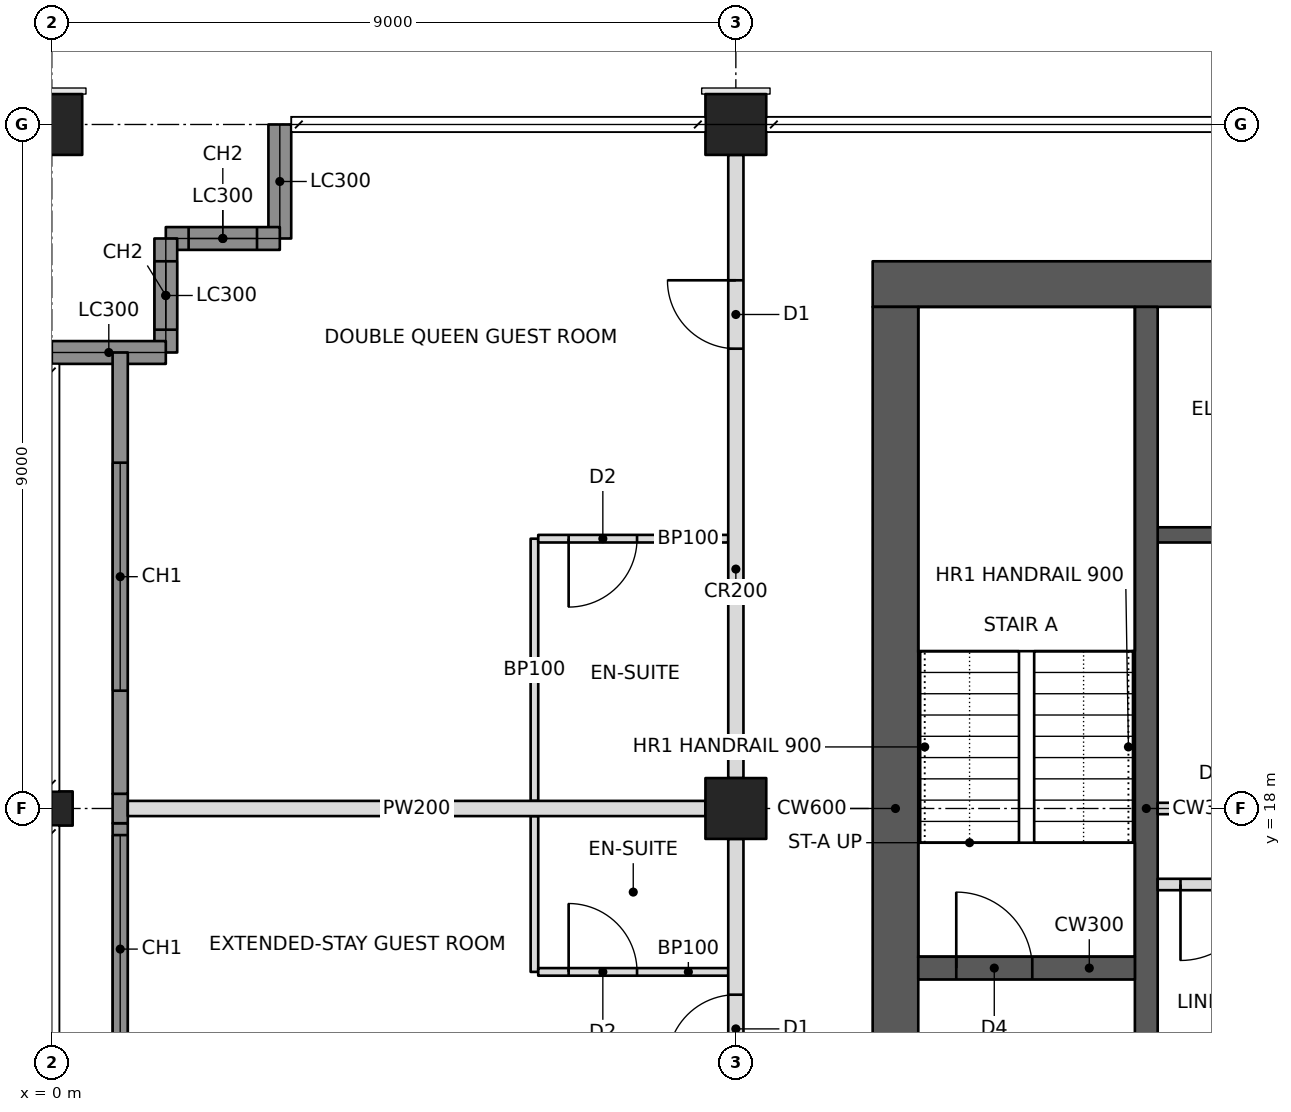
"""IFC4 building model, lengths in metres.
Left out: names, types, materials, properties, quantities, classifications, styles, units other than length and angle.
Written with IfcOpenShell. Run it as: python <this file> out.ifc"""

import sys

from ifc_helpers import new_model, si_unit, direction, frame, frame_2d, origin, origin_2d, place, context, subcontext, project, spatial, rectangle, hollow_rectangle, i_section, extrude, element, fill, save


model = new_model("IFC4")
c1 = context("Model", 3, precision=1e-05, world=origin(), true_north=direction((0.0, 1.0)))
c2 = subcontext(c1, "Body", "Model", "MODEL_VIEW")
j1 = project(units=[si_unit("LENGTHUNIT", "METRE"), si_unit("PLANEANGLEUNIT", "RADIAN")], contexts=[c1])
p1 = place(None, origin())
s1 = spatial("IfcSite", under=j1, at=p1, CompositionType="ELEMENT")
p2 = place(p1, origin())
s2 = spatial("IfcBuilding", under=s1, at=p2, CompositionType="ELEMENT")
p3 = place(p2, frame((0.0, 0.0, 170.6)))
s3 = spatial("IfcBuildingStorey", under=s2, at=p3, CompositionType="ELEMENT", Elevation=170.6)
p4 = place(p3, frame((0.0, 18.0, 0.0), z_axis=(0.0, 0.0, 1.0), x_axis=(0.0, 1.0, 0.0)))
e1 = element("IfcColumn", 1, at=p4, inside=s3, PredefinedType="COLUMN", context=c2, shape_type="SweptSolid", body=[
    extrude(i_section(OverallWidth=0.449, OverallDepth=0.549, WebThickness=0.072, FlangeThickness=0.115, at=origin_2d()), origin(), (0.0, 0.0, 1.0), 3.4),
])
p5 = place(p3, frame((0.0, 27.0, 0.0), z_axis=(0.0, 0.0, 1.0), x_axis=(0.0, 1.0, 0.0)))
e2 = element("IfcColumn", 2, at=p5, inside=s3, PredefinedType="COLUMN", context=c2, shape_type="SweptSolid", body=[
    extrude(hollow_rectangle(XDim=0.8, YDim=0.8, WallThickness=0.07, at=origin_2d()), origin(), (0.0, 0.0, 1.0), 3.4),
])
p6 = place(p3, frame((9.0, 18.0, 0.0), z_axis=(0.0, 0.0, 1.0), x_axis=(1.0, 0.0, 0.0)))
e3 = element("IfcColumn", 3, at=p6, inside=s3, PredefinedType="COLUMN", context=c2, shape_type="SweptSolid", body=[
    extrude(hollow_rectangle(XDim=0.8, YDim=0.8, WallThickness=0.06, at=origin_2d()), origin(), (0.0, 0.0, 1.0), 3.4),
])
p7 = place(p3, frame((9.0, 27.0, 0.0), z_axis=(0.0, 0.0, 1.0), x_axis=(1.0, 0.0, 0.0)))
e4 = element("IfcColumn", 4, at=p7, inside=s3, PredefinedType="COLUMN", context=c2, shape_type="SweptSolid", body=[
    extrude(hollow_rectangle(XDim=0.8, YDim=0.8, WallThickness=0.07, at=origin_2d()), origin(), (0.0, 0.0, 1.0), 3.4),
])
p8 = place(p3, frame((10.8, 24.9, 0.0), z_axis=(0.0, 0.0, 1.0), x_axis=(1.0, 0.0, 0.0)))
e5 = element("IfcWall", 5, at=p8, inside=s3, PredefinedType="SHEAR", context=c2, shape_type="SweptSolid", body=[
    extrude(rectangle(XDim=23.4, YDim=0.6, at=frame_2d((11.7, 0.0))), origin(), (0.0, 0.0, 1.0), 3.4),
])
p9 = place(p8, frame((17.2, 0.0, 0.0)))
e6 = element("IfcOpeningElement", 6, at=p9, cuts=e5, PredefinedType="OPENING", context=c2, shape_type="SweptSolid", body=[
    extrude(rectangle(XDim=1.8, YDim=2.1, at=frame_2d((0.9, 1.05))), frame((0.0, 0.31, 0.0), z_axis=(0.0, -1.0, 0.0), x_axis=(1.0, 0.0, 0.0)), (0.0, 0.0, 1.0), 0.62),
])
p10 = place(p8, frame((21.1, 0.0, 0.0)))
e7 = element("IfcOpeningElement", 7, at=p10, cuts=e5, PredefinedType="OPENING", context=c2, shape_type="SweptSolid", body=[
    extrude(rectangle(XDim=1.0, YDim=2.1, at=frame_2d((0.5, 1.05))), frame((0.0, 0.31, 0.0), z_axis=(0.0, -1.0, 0.0), x_axis=(1.0, 0.0, 0.0)), (0.0, 0.0, 1.0), 0.62),
])
p11 = place(p8, frame((4.9, 0.0, 0.0)))
e8 = element("IfcOpeningElement", 8, at=p11, cuts=e5, PredefinedType="OPENING", context=c2, shape_type="SweptSolid", body=[
    extrude(rectangle(XDim=1.0, YDim=2.1, at=frame_2d((0.5, 1.05))), frame((0.0, 0.31, 0.0), z_axis=(0.0, -1.0, 0.0), x_axis=(1.0, 0.0, 0.0)), (0.0, 0.0, 1.0), 0.62),
])
p12 = place(p3, frame((11.1, 11.4, 0.0), z_axis=(0.0, 0.0, 1.0), x_axis=(0.0, 1.0, 0.0)))
e9 = element("IfcWall", 9, at=p12, inside=s3, PredefinedType="SHEAR", context=c2, shape_type="SweptSolid", body=[
    extrude(rectangle(XDim=13.2, YDim=0.6, at=frame_2d((6.6, 0.0))), origin(), (0.0, 0.0, 1.0), 3.4),
])
p13 = place(p3, frame((14.4, 11.4, 0.0), z_axis=(0.0, 0.0, 1.0), x_axis=(0.0, 1.0, 0.0)))
e10 = element("IfcWall", 10, at=p13, inside=s3, PredefinedType="SHEAR", context=c2, shape_type="SweptSolid", body=[
    extrude(rectangle(XDim=13.2, YDim=0.3, at=frame_2d((6.6, 0.0))), origin(), (0.0, 0.0, 1.0), 3.4),
])
p14 = place(p3, frame((11.4, 15.9, 0.0), z_axis=(0.0, 0.0, 1.0), x_axis=(1.0, 0.0, 0.0)))
e11 = element("IfcWall", 11, at=p14, inside=s3, PredefinedType="SHEAR", context=c2, shape_type="SweptSolid", body=[
    extrude(rectangle(XDim=2.85, YDim=0.3, at=frame_2d((1.425, 0.0))), origin(), (0.0, 0.0, 1.0), 3.4),
])
p15 = place(p14, frame((0.5, 0.0, 0.0)))
e12 = element("IfcOpeningElement", 12, at=p15, cuts=e11, PredefinedType="OPENING", context=c2, shape_type="SweptSolid", body=[
    extrude(rectangle(XDim=1.0, YDim=2.1, at=frame_2d((0.5, 1.05))), frame((0.0, 0.16, 0.0), z_axis=(0.0, -1.0, 0.0), x_axis=(1.0, 0.0, 0.0)), (0.0, 0.0, 1.0), 0.32),
])
p16 = place(p3, frame((14.55, 18.0, 0.0), z_axis=(0.0, 0.0, 1.0), x_axis=(1.0, 0.0, 0.0)))
e13 = element("IfcWall", 13, at=p16, inside=s3, PredefinedType="PARTITIONING", context=c2, shape_type="SweptSolid", body=[
    extrude(rectangle(XDim=3.3, YDim=0.15, at=frame_2d((1.65, 0.0))), origin(), (0.0, 0.0, 1.0), 3.2),
])
p17 = place(p3, frame((14.55, 21.6, 0.0), z_axis=(0.0, 0.0, 1.0), x_axis=(1.0, 0.0, 0.0)))
e14 = element("IfcWall", 14, at=p17, inside=s3, PredefinedType="SHEAR", context=c2, shape_type="SweptSolid", body=[
    extrude(rectangle(XDim=3.3, YDim=0.2, at=frame_2d((1.65, 0.0))), origin(), (0.0, 0.0, 1.0), 3.4),
])
p18 = place(p3, frame((3.0, 27.0, 0.0), z_axis=(0.0, 0.0, 1.0), x_axis=(0.0, -1.0, 0.0)))
e15 = element("IfcWall", 15, at=p18, inside=s3, PredefinedType="SOLIDWALL", context=c2, shape_type="SweptSolid", body=[
    extrude(rectangle(XDim=1.5, YDim=0.3, at=frame_2d((0.75, 0.0))), origin(), (0.0, 0.0, 1.0), 2.42),
])
p19 = place(p3, frame((3.0, 25.5, 0.0), z_axis=(0.0, 0.0, 1.0), x_axis=(-1.0, 0.0, 0.0)))
e16 = element("IfcWall", 16, at=p19, inside=s3, PredefinedType="SOLIDWALL", context=c2, shape_type="SweptSolid", body=[
    extrude(rectangle(XDim=1.5, YDim=0.3, at=frame_2d((0.75, 0.0))), origin(), (0.0, 0.0, 1.0), 3.2),
])
p20 = place(p19, frame((0.3, 0.0, 0.6)))
e17 = element("IfcOpeningElement", 17, at=p20, cuts=e16, PredefinedType="OPENING", context=c2, shape_type="SweptSolid", body=[
    extrude(rectangle(XDim=0.9, YDim=2.2, at=frame_2d((0.45, 1.1))), frame((0.0, 0.16, 0.0), z_axis=(0.0, -1.0, 0.0), x_axis=(1.0, 0.0, 0.0)), (0.0, 0.0, 1.0), 0.32),
])
p21 = place(p3, frame((1.5, 25.5, 0.0), z_axis=(0.0, 0.0, 1.0), x_axis=(0.0, -1.0, 0.0)))
e18 = element("IfcWall", 18, at=p21, inside=s3, PredefinedType="SOLIDWALL", context=c2, shape_type="SweptSolid", body=[
    extrude(rectangle(XDim=1.5, YDim=0.3, at=frame_2d((0.75, 0.0))), origin(), (0.0, 0.0, 1.0), 3.2),
])
p22 = place(p21, frame((0.3, 0.0, 0.6)))
e19 = element("IfcOpeningElement", 19, at=p22, cuts=e18, PredefinedType="OPENING", context=c2, shape_type="SweptSolid", body=[
    extrude(rectangle(XDim=0.9, YDim=2.2, at=frame_2d((0.45, 1.1))), frame((0.0, 0.16, 0.0), z_axis=(0.0, -1.0, 0.0), x_axis=(1.0, 0.0, 0.0)), (0.0, 0.0, 1.0), 0.32),
])
p23 = place(p3, frame((1.5, 24.0, 0.0), z_axis=(0.0, 0.0, 1.0), x_axis=(-1.0, 0.0, 0.0)))
e20 = element("IfcWall", 20, at=p23, inside=s3, PredefinedType="SOLIDWALL", context=c2, shape_type="SweptSolid", body=[
    extrude(rectangle(XDim=1.5, YDim=0.3, at=frame_2d((0.75, 0.0))), origin(), (0.0, 0.0, 1.0), 2.42),
])
p24 = place(p3, frame((9.0, 10.8, 0.0), z_axis=(0.0, 0.0, 1.0), x_axis=(0.0, 1.0, 0.0)))
e21 = element("IfcWall", 21, at=p24, inside=s3, PredefinedType="PARTITIONING", context=c2, shape_type="SweptSolid", body=[
    extrude(rectangle(XDim=6.8, YDim=0.2, at=frame_2d((3.4, 0.0))), origin(), (0.0, 0.0, 1.0), 2.405),
])
p25 = place(p24, frame((0.25, 0.0, 0.0)))
e22 = element("IfcOpeningElement", 22, at=p25, cuts=e21, PredefinedType="OPENING", context=c2, shape_type="SweptSolid", body=[
    extrude(rectangle(XDim=0.9, YDim=2.1, at=frame_2d((0.45, 1.05))), frame((0.0, 0.11, 0.0), z_axis=(0.0, -1.0, 0.0), x_axis=(1.0, 0.0, 0.0)), (0.0, 0.0, 1.0), 0.22),
])
p26 = place(p24, frame((3.85, 0.0, 0.0)))
e23 = element("IfcOpeningElement", 23, at=p26, cuts=e21, PredefinedType="OPENING", context=c2, shape_type="SweptSolid", body=[
    extrude(rectangle(XDim=0.9, YDim=2.1, at=frame_2d((0.45, 1.05))), frame((0.0, 0.11, 0.0), z_axis=(0.0, -1.0, 0.0), x_axis=(1.0, 0.0, 0.0)), (0.0, 0.0, 1.0), 0.22),
])
p27 = place(p3, frame((9.0, 18.4, 0.0), z_axis=(0.0, 0.0, 1.0), x_axis=(0.0, 1.0, 0.0)))
e24 = element("IfcWall", 24, at=p27, inside=s3, PredefinedType="PARTITIONING", context=c2, shape_type="SweptSolid", body=[
    extrude(rectangle(XDim=8.2, YDim=0.2, at=frame_2d((4.1, 0.0))), origin(), (0.0, 0.0, 1.0), 2.405),
])
p28 = place(p27, frame((5.65, 0.0, 0.0)))
e25 = element("IfcOpeningElement", 25, at=p28, cuts=e24, PredefinedType="OPENING", context=c2, shape_type="SweptSolid", body=[
    extrude(rectangle(XDim=0.9, YDim=2.1, at=frame_2d((0.45, 1.05))), frame((0.0, 0.11, 0.0), z_axis=(0.0, -1.0, 0.0), x_axis=(1.0, 0.0, 0.0)), (0.0, 0.0, 1.0), 0.22),
])
p29 = place(p3, frame((8.6, 18.0, 0.0), z_axis=(0.0, 0.0, 1.0), x_axis=(-1.0, 0.0, 0.0)))
e26 = element("IfcWall", 26, at=p29, inside=s3, PredefinedType="PARTITIONING", context=c2, shape_type="SweptSolid", body=[
    extrude(rectangle(XDim=7.6, YDim=0.2, at=frame_2d((3.8, 0.0))), origin(), (0.0, 0.0, 1.0), 2.405),
])
p30 = place(p3, frame((6.35, 15.85, 0.0), z_axis=(0.0, 0.0, 1.0), x_axis=(0.0, 1.0, 0.0)))
e27 = element("IfcWall", 27, at=p30, inside=s3, PredefinedType="PARTITIONING", context=c2, shape_type="SweptSolid", body=[
    extrude(rectangle(XDim=2.05, YDim=0.1, at=frame_2d((1.025, 0.0))), origin(), (0.0, 0.0, 1.0), 2.404),
])
p31 = place(p3, frame((8.9, 15.85, 0.0), z_axis=(0.0, 0.0, 1.0), x_axis=(-1.0, 0.0, 0.0)))
e28 = element("IfcWall", 28, at=p31, inside=s3, PredefinedType="PARTITIONING", context=c2, shape_type="SweptSolid", body=[
    extrude(rectangle(XDim=2.5, YDim=0.1, at=frame_2d((1.25, 0.0))), origin(), (0.0, 0.0, 1.0), 2.404),
])
p32 = place(p31, frame((1.2, 0.0, 0.0)))
e29 = element("IfcOpeningElement", 29, at=p32, cuts=e28, PredefinedType="OPENING", context=c2, shape_type="SweptSolid", body=[
    extrude(rectangle(XDim=0.9, YDim=2.1, at=frame_2d((0.45, 1.05))), frame((0.0, 0.06, 0.0), z_axis=(0.0, -1.0, 0.0), x_axis=(1.0, 0.0, 0.0)), (0.0, 0.0, 1.0), 0.12),
])
p33 = place(p3, frame((6.35, 18.1, 0.0), z_axis=(0.0, 0.0, 1.0), x_axis=(0.0, 1.0, 0.0)))
e30 = element("IfcWall", 30, at=p33, inside=s3, PredefinedType="PARTITIONING", context=c2, shape_type="SweptSolid", body=[
    extrude(rectangle(XDim=3.45, YDim=0.1, at=frame_2d((1.725, 0.0))), origin(), (0.0, 0.0, 1.0), 2.404),
])
p34 = place(p3, frame((8.9, 21.55, 0.0), z_axis=(0.0, 0.0, 1.0), x_axis=(-1.0, 0.0, 0.0)))
e31 = element("IfcWall", 31, at=p34, inside=s3, PredefinedType="PARTITIONING", context=c2, shape_type="SweptSolid", body=[
    extrude(rectangle(XDim=2.5, YDim=0.1, at=frame_2d((1.25, 0.0))), origin(), (0.0, 0.0, 1.0), 2.404),
])
p35 = place(p34, frame((1.2, 0.0, 0.0)))
e32 = element("IfcOpeningElement", 32, at=p35, cuts=e31, PredefinedType="OPENING", context=c2, shape_type="SweptSolid", body=[
    extrude(rectangle(XDim=0.9, YDim=2.1, at=frame_2d((0.45, 1.05))), frame((0.0, 0.06, 0.0), z_axis=(0.0, -1.0, 0.0), x_axis=(1.0, 0.0, 0.0)), (0.0, 0.0, 1.0), 0.12),
])
p36 = place(p3, frame((14.55, 17.0, 0.0), z_axis=(0.0, 0.0, 1.0), x_axis=(1.0, 0.0, 0.0)))
e33 = element("IfcWall", 33, at=p36, inside=s3, PredefinedType="PARTITIONING", context=c2, shape_type="SweptSolid", body=[
    extrude(rectangle(XDim=3.3, YDim=0.15, at=frame_2d((1.65, 0.0))), origin(), (0.0, 0.0, 1.0), 3.2),
])
p37 = place(p36, frame((0.3, 0.0, 0.0)))
e34 = element("IfcOpeningElement", 34, at=p37, cuts=e33, PredefinedType="OPENING", context=c2, shape_type="SweptSolid", body=[
    extrude(rectangle(XDim=1.0, YDim=2.1, at=frame_2d((0.5, 1.05))), frame((0.0, 0.085, 0.0), z_axis=(0.0, -1.0, 0.0), x_axis=(1.0, 0.0, 0.0)), (0.0, 0.0, 1.0), 0.17),
])
p38 = place(p3, frame((0.9, 9.135, 0.0), z_axis=(0.0, 0.0, 1.0), x_axis=(0.0, 1.0, 0.0)))
e35 = element("IfcWall", 35, at=p38, inside=s3, PredefinedType="SOLIDWALL", context=c2, shape_type="SweptSolid", body=[
    extrude(rectangle(XDim=8.671, YDim=0.2, at=frame_2d((4.335, 0.0))), origin(), (0.0, 0.0, 1.0), 3.2),
])
p39 = place(p38, frame((2.015, 0.0, 0.6)))
e36 = element("IfcOpeningElement", 36, at=p39, cuts=e35, PredefinedType="OPENING", context=c2, shape_type="SweptSolid", body=[
    extrude(rectangle(XDim=3.0, YDim=2.2, at=frame_2d((1.5, 1.1))), frame((0.0, 0.11, 0.0), z_axis=(0.0, -1.0, 0.0), x_axis=(1.0, 0.0, 0.0)), (0.0, 0.0, 1.0), 0.22),
])
p40 = place(p38, frame((5.515, 0.0, 0.6)))
e37 = element("IfcOpeningElement", 37, at=p40, cuts=e35, PredefinedType="OPENING", context=c2, shape_type="SweptSolid", body=[
    extrude(rectangle(XDim=3.0, YDim=2.2, at=frame_2d((1.5, 1.1))), frame((0.0, 0.11, 0.0), z_axis=(0.0, -1.0, 0.0), x_axis=(1.0, 0.0, 0.0)), (0.0, 0.0, 1.0), 0.22),
])
p41 = place(p3, frame((0.9, 17.806, 0.0), z_axis=(0.0, 0.0, 1.0), x_axis=(0.0, 1.0, 0.0)))
e38 = element("IfcWall", 38, at=p41, inside=s3, PredefinedType="SOLIDWALL", context=c2, shape_type="SweptSolid", body=[
    extrude(rectangle(XDim=0.388, YDim=0.2, at=frame_2d((0.194, 0.0))), origin(), (0.0, 0.0, 1.0), 2.404),
])
p42 = place(p3, frame((0.9, 18.194, 0.0), z_axis=(0.0, 0.0, 1.0), x_axis=(0.0, 1.0, 0.0)))
e39 = element("IfcWall", 39, at=p42, inside=s3, PredefinedType="SOLIDWALL", context=c2, shape_type="SweptSolid", body=[
    extrude(rectangle(XDim=5.806, YDim=0.2, at=frame_2d((2.903, 0.0))), origin(), (0.0, 0.0, 1.0), 3.2),
])
p43 = place(p42, frame((1.356, 0.0, 0.6)))
e40 = element("IfcOpeningElement", 40, at=p43, cuts=e39, PredefinedType="OPENING", context=c2, shape_type="SweptSolid", body=[
    extrude(rectangle(XDim=3.0, YDim=2.2, at=frame_2d((1.5, 1.1))), frame((0.0, 0.11, 0.0), z_axis=(0.0, -1.0, 0.0), x_axis=(1.0, 0.0, 0.0)), (0.0, 0.0, 1.0), 0.22),
])
p44 = place(p20, origin())
e41 = element("IfcWindow", 41, at=p44, inside=s3, PartitioningType="SINGLE_PANEL", PredefinedType="WINDOW", context=c2, shape_type="SweptSolid", body=[
    extrude(rectangle(XDim=0.9, YDim=2.2, at=frame_2d((0.45, 1.1))), frame((0.0, 0.03, 0.0), z_axis=(0.0, -1.0, 0.0), x_axis=(1.0, 0.0, 0.0)), (0.0, 0.0, 1.0), 0.06),
])
fill(e17, e41)
p45 = place(p22, origin())
e42 = element("IfcWindow", 42, at=p45, inside=s3, PartitioningType="SINGLE_PANEL", PredefinedType="WINDOW", context=c2, shape_type="SweptSolid", body=[
    extrude(rectangle(XDim=0.9, YDim=2.2, at=frame_2d((0.45, 1.1))), frame((0.0, 0.03, 0.0), z_axis=(0.0, -1.0, 0.0), x_axis=(1.0, 0.0, 0.0)), (0.0, 0.0, 1.0), 0.06),
])
fill(e19, e42)
p46 = place(p40, origin())
e43 = element("IfcWindow", 43, at=p46, inside=s3, PartitioningType="TRIPLE_PANEL_VERTICAL", PredefinedType="WINDOW", context=c2, shape_type="SweptSolid", body=[
    extrude(rectangle(XDim=3.0, YDim=2.2, at=frame_2d((1.5, 1.1))), frame((0.0, 0.03, 0.0), z_axis=(0.0, -1.0, 0.0), x_axis=(1.0, 0.0, 0.0)), (0.0, 0.0, 1.0), 0.06),
])
fill(e37, e43)
p47 = place(p43, origin())
e44 = element("IfcWindow", 44, at=p47, inside=s3, PartitioningType="TRIPLE_PANEL_VERTICAL", PredefinedType="WINDOW", context=c2, shape_type="SweptSolid", body=[
    extrude(rectangle(XDim=3.0, YDim=2.2, at=frame_2d((1.5, 1.1))), frame((0.0, 0.03, 0.0), z_axis=(0.0, -1.0, 0.0), x_axis=(1.0, 0.0, 0.0)), (0.0, 0.0, 1.0), 0.06),
])
fill(e40, e44)
p48 = place(p32, frame((0.9, 0.0, 0.0), z_axis=(0.0, 0.0, 1.0), x_axis=(-1.0, 0.0, 0.0)))
e45 = element("IfcDoor", 45, at=p48, inside=s3, OperationType="SINGLE_SWING_LEFT", PredefinedType="DOOR", context=c2, shape_type="SweptSolid", body=[
    extrude(rectangle(XDim=0.9, YDim=2.1, at=frame_2d((0.45, 1.05))), frame((0.0, 0.025, 0.0), z_axis=(0.0, -1.0, 0.0), x_axis=(1.0, 0.0, 0.0)), (0.0, 0.0, 1.0), 0.05),
])
fill(e29, e45)
p49 = place(p26, origin())
e46 = element("IfcDoor", 46, at=p49, inside=s3, OperationType="SINGLE_SWING_LEFT", PredefinedType="DOOR", context=c2, shape_type="SweptSolid", body=[
    extrude(rectangle(XDim=0.9, YDim=2.1, at=frame_2d((0.45, 1.05))), frame((0.0, 0.025, 0.0), z_axis=(0.0, -1.0, 0.0), x_axis=(1.0, 0.0, 0.0)), (0.0, 0.0, 1.0), 0.05),
])
fill(e23, e46)
p50 = place(p35, origin())
e47 = element("IfcDoor", 47, at=p50, inside=s3, OperationType="SINGLE_SWING_RIGHT", PredefinedType="DOOR", context=c2, shape_type="SweptSolid", body=[
    extrude(rectangle(XDim=0.9, YDim=2.1, at=frame_2d((0.45, 1.05))), frame((0.0, 0.025, 0.0), z_axis=(0.0, -1.0, 0.0), x_axis=(1.0, 0.0, 0.0)), (0.0, 0.0, 1.0), 0.05),
])
fill(e32, e47)
p51 = place(p28, origin())
e48 = element("IfcDoor", 48, at=p51, inside=s3, OperationType="SINGLE_SWING_RIGHT", PredefinedType="DOOR", context=c2, shape_type="SweptSolid", body=[
    extrude(rectangle(XDim=0.9, YDim=2.1, at=frame_2d((0.45, 1.05))), frame((0.0, 0.025, 0.0), z_axis=(0.0, -1.0, 0.0), x_axis=(1.0, 0.0, 0.0)), (0.0, 0.0, 1.0), 0.05),
])
fill(e25, e48)
p52 = place(p37, frame((1.0, 0.0, 0.0), z_axis=(0.0, 0.0, 1.0), x_axis=(-1.0, 0.0, 0.0)))
e49 = element("IfcDoor", 49, at=p52, inside=s3, OperationType="SINGLE_SWING_RIGHT", PredefinedType="DOOR", context=c2, shape_type="SweptSolid", body=[
    extrude(rectangle(XDim=1.0, YDim=2.1, at=frame_2d((0.5, 1.05))), frame((0.0, 0.025, 0.0), z_axis=(0.0, -1.0, 0.0), x_axis=(1.0, 0.0, 0.0)), (0.0, 0.0, 1.0), 0.05),
])
fill(e34, e49)
p53 = place(p15, origin())
e50 = element("IfcDoor", 50, at=p53, inside=s3, OperationType="SINGLE_SWING_LEFT", PredefinedType="DOOR", context=c2, shape_type="SweptSolid", body=[
    extrude(rectangle(XDim=1.0, YDim=2.1, at=frame_2d((0.5, 1.05))), frame((0.0, 0.025, 0.0), z_axis=(0.0, -1.0, 0.0), x_axis=(1.0, 0.0, 0.0)), (0.0, 0.0, 1.0), 0.05),
])
fill(e12, e50)
save(model, sys.argv[1])
